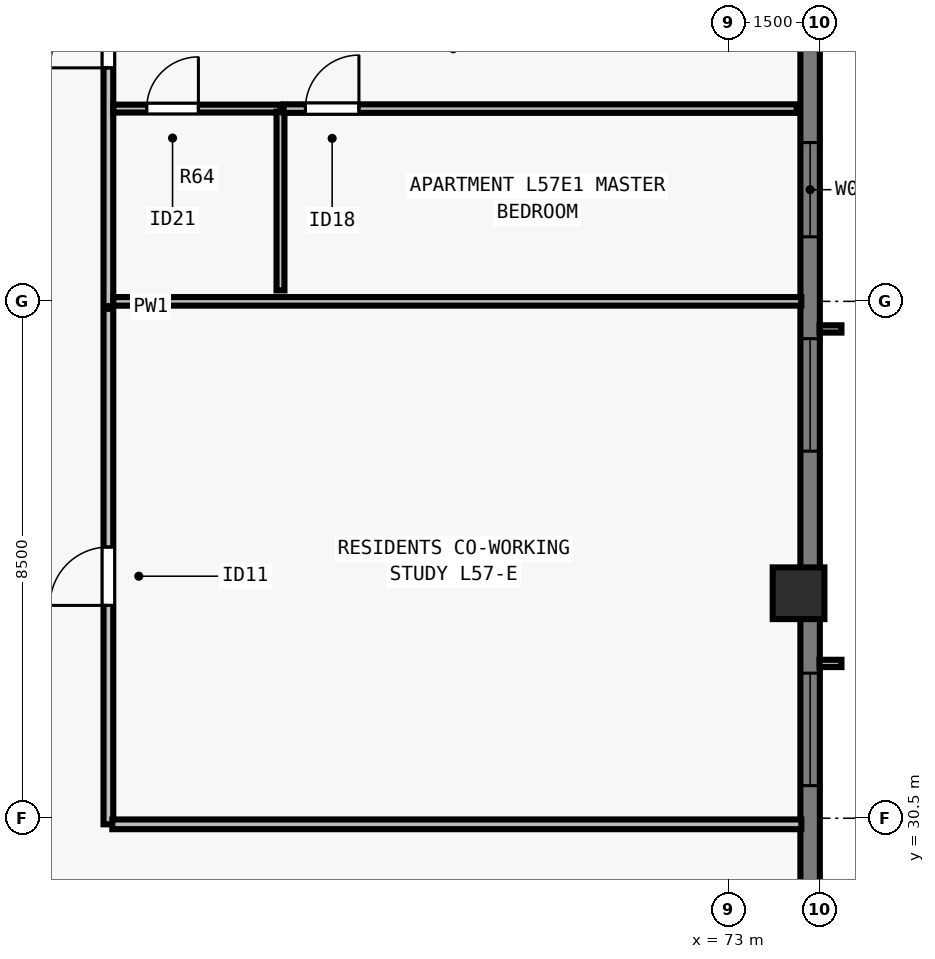
"""IFC4 building model, lengths in metres.
Left out: names, types, materials, properties, quantities, classifications, styles, units other than length and angle.
Written with IfcOpenShell. Run it as: python <this file> out.ifc"""

import sys

from ifc_helpers import new_model, si_unit, direction, frame, frame_2d, origin, origin_2d, place, context, subcontext, project, spatial, rectangle, extrude, element, fill, save


model = new_model("IFC4")
c1 = context("Model", 3, precision=1e-05, world=origin(), true_north=direction((0.0, 1.0)))
c2 = subcontext(c1, "Body", "Model", "MODEL_VIEW")
j1 = project(units=[si_unit("LENGTHUNIT", "METRE"), si_unit("PLANEANGLEUNIT", "RADIAN")], contexts=[c1])
p1 = place(None, origin())
s1 = spatial("IfcSite", under=j1, at=p1, CompositionType="ELEMENT")
p2 = place(p1, origin())
s2 = spatial("IfcBuilding", under=s1, at=p2, CompositionType="ELEMENT")
p3 = place(p2, frame((0.0, 0.0, 209.5)))
s3 = spatial("IfcBuildingStorey", under=s2, at=p3, CompositionType="ELEMENT", Elevation=209.5)
p4 = place(p3, frame((74.15, 34.2, 0.0), z_axis=(0.0, 0.0, 1.0), x_axis=(0.0, 1.0, 0.0)))
e1 = element("IfcColumn", 1, at=p4, inside=s3, PredefinedType="COLUMN", context=c2, shape_type="SweptSolid", body=[
    extrude(rectangle(XDim=0.85, YDim=0.85, at=origin_2d()), origin(), (0.0, 0.0, 1.0), 3.5),
])
p5 = place(p3, frame((74.34, 56.5, 0.0), z_axis=(0.0, 0.0, 1.0), x_axis=(0.0, -1.0, 0.0)))
e2 = element("IfcWall", 2, at=p5, inside=s3, PredefinedType="SOLIDWALL", context=c2, shape_type="SweptSolid", body=[
    extrude(rectangle(XDim=34.702, YDim=0.32, at=frame_2d((17.351, 0.0))), origin(), (0.0, 0.0, 1.0), 3.29),
])
p6 = place(p5, frame((4.163, 0.0, 0.8)))
e3 = element("IfcOpeningElement", 3, at=p6, cuts=e2, PredefinedType="OPENING", context=c2, shape_type="SweptSolid", body=[
    extrude(rectangle(XDim=1.85, YDim=1.678, at=frame_2d((0.925, 0.839))), frame((0.0, 0.17, 0.0), z_axis=(0.0, -1.0, 0.0), x_axis=(1.0, 0.0, 0.0)), (0.0, 0.0, 1.0), 0.34),
])
p7 = place(p5, frame((6.888, 0.0, 0.8)))
e4 = element("IfcOpeningElement", 4, at=p7, cuts=e2, PredefinedType="OPENING", context=c2, shape_type="SweptSolid", body=[
    extrude(rectangle(XDim=1.55, YDim=1.678, at=frame_2d((0.775, 0.839))), frame((0.0, 0.17, 0.0), z_axis=(0.0, -1.0, 0.0), x_axis=(1.0, 0.0, 0.0)), (0.0, 0.0, 1.0), 0.34),
])
p8 = place(p5, frame((10.113, 0.0, 0.8)))
e5 = element("IfcOpeningElement", 5, at=p8, cuts=e2, PredefinedType="OPENING", context=c2, shape_type="SweptSolid", body=[
    extrude(rectangle(XDim=1.85, YDim=1.678, at=frame_2d((0.925, 0.839))), frame((0.0, 0.17, 0.0), z_axis=(0.0, -1.0, 0.0), x_axis=(1.0, 0.0, 0.0)), (0.0, 0.0, 1.0), 0.34),
])
p9 = place(p5, frame((14.888, 0.0, 0.8)))
e6 = element("IfcOpeningElement", 6, at=p9, cuts=e2, PredefinedType="OPENING", context=c2, shape_type="SweptSolid", body=[
    extrude(rectangle(XDim=1.55, YDim=1.678, at=frame_2d((0.775, 0.839))), frame((0.0, 0.17, 0.0), z_axis=(0.0, -1.0, 0.0), x_axis=(1.0, 0.0, 0.0)), (0.0, 0.0, 1.0), 0.34),
])
p10 = place(p5, frame((18.114, 0.0, 0.8)))
e7 = element("IfcOpeningElement", 7, at=p10, cuts=e2, PredefinedType="OPENING", context=c2, shape_type="SweptSolid", body=[
    extrude(rectangle(XDim=1.85, YDim=1.678, at=frame_2d((0.925, 0.839))), frame((0.0, 0.17, 0.0), z_axis=(0.0, -1.0, 0.0), x_axis=(1.0, 0.0, 0.0)), (0.0, 0.0, 1.0), 0.34),
])
p11 = place(p5, frame((23.614, 0.0, 0.8)))
e8 = element("IfcOpeningElement", 8, at=p11, cuts=e2, PredefinedType="OPENING", context=c2, shape_type="SweptSolid", body=[
    extrude(rectangle(XDim=1.85, YDim=1.678, at=frame_2d((0.925, 0.839))), frame((0.0, 0.17, 0.0), z_axis=(0.0, -1.0, 0.0), x_axis=(1.0, 0.0, 0.0)), (0.0, 0.0, 1.0), 0.34),
])
p12 = place(p5, frame((28.839, 0.0, 0.8)))
e9 = element("IfcOpeningElement", 9, at=p12, cuts=e2, PredefinedType="OPENING", context=c2, shape_type="SweptSolid", body=[
    extrude(rectangle(XDim=1.55, YDim=1.678, at=frame_2d((0.775, 0.839))), frame((0.0, 0.17, 0.0), z_axis=(0.0, -1.0, 0.0), x_axis=(1.0, 0.0, 0.0)), (0.0, 0.0, 1.0), 0.34),
])
p13 = place(p3, frame((62.8, 30.4, 0.0), z_axis=(0.0, 0.0, 1.0), x_axis=(0.0, 1.0, 0.0)))
e10 = element("IfcWall", 10, at=p13, inside=s3, PredefinedType="PARTITIONING", context=c2, shape_type="SweptSolid", body=[
    extrude(rectangle(XDim=17.2, YDim=0.16, at=frame_2d((8.6, 0.0))), origin(), (0.0, 0.0, 1.0), 3.29),
])
p14 = place(p13, frame((3.6, 0.0, 0.0)))
e11 = element("IfcOpeningElement", 11, at=p14, cuts=e10, PredefinedType="OPENING", context=c2, shape_type="SweptSolid", body=[
    extrude(rectangle(XDim=0.96, YDim=2.12, at=frame_2d((0.48, 1.06))), frame((0.0, 0.09, 0.0), z_axis=(0.0, -1.0, 0.0), x_axis=(1.0, 0.0, 0.0)), (0.0, 0.0, 1.0), 0.18),
])
p15 = place(p13, frame((12.44, 0.0, 0.0)))
e12 = element("IfcOpeningElement", 12, at=p15, cuts=e10, PredefinedType="OPENING", context=c2, shape_type="SweptSolid", body=[
    extrude(rectangle(XDim=0.96, YDim=2.18, at=frame_2d((0.48, 1.09))), frame((0.0, 0.09, 0.0), z_axis=(0.0, -1.0, 0.0), x_axis=(1.0, 0.0, 0.0)), (0.0, 0.0, 1.0), 0.18),
])
p16 = place(p3, frame((62.865, 30.4, 0.0), z_axis=(0.0, 0.0, 1.0), x_axis=(1.0, 0.0, 0.0)))
e13 = element("IfcWall", 13, at=p16, inside=s3, PredefinedType="PARTITIONING", context=c2, shape_type="SweptSolid", body=[
    extrude(rectangle(XDim=11.33, YDim=0.16, at=frame_2d((5.665, 0.0))), origin(), (0.0, 0.0, 1.0), 3.29),
])
p17 = place(p3, frame((62.88, 39.0, 0.0), z_axis=(0.0, 0.0, 1.0), x_axis=(1.0, 0.0, 0.0)))
e14 = element("IfcWall", 14, at=p17, inside=s3, PredefinedType="PARTITIONING", context=c2, shape_type="SweptSolid", body=[
    extrude(rectangle(XDim=11.315, YDim=0.14, at=frame_2d((5.658, 0.0))), origin(), (0.0, 0.0, 1.0), 3.29),
])
p18 = place(p3, frame((62.88, 42.17, 0.0), z_axis=(0.0, 0.0, 1.0), x_axis=(1.0, 0.0, 0.0)))
e15 = element("IfcWall", 15, at=p18, inside=s3, PredefinedType="PLUMBINGWALL", context=c2, shape_type="SweptSolid", body=[
    extrude(rectangle(XDim=2.75, YDim=0.13, at=frame_2d((1.375, 0.0))), origin(), (0.0, 0.0, 1.0), 3.29),
])
p19 = place(p18, frame((0.55, 0.0, 0.0)))
e16 = element("IfcOpeningElement", 16, at=p19, cuts=e15, PredefinedType="OPENING", context=c2, shape_type="SweptSolid", body=[
    extrude(rectangle(XDim=0.85, YDim=2.08, at=frame_2d((0.425, 1.04))), frame((0.0, 0.075, 0.0), z_axis=(0.0, -1.0, 0.0), x_axis=(1.0, 0.0, 0.0)), (0.0, 0.0, 1.0), 0.15),
])
p20 = place(p3, frame((65.63, 39.18, 0.0), z_axis=(0.0, 0.0, 1.0), x_axis=(0.0, 1.0, 0.0)))
e17 = element("IfcWall", 17, at=p20, inside=s3, PredefinedType="PLUMBINGWALL", context=c2, shape_type="SweptSolid", body=[
    extrude(rectangle(XDim=2.94, YDim=0.13, at=frame_2d((1.47, 0.0))), origin(), (0.0, 0.0, 1.0), 3.29),
])
p21 = place(p3, frame((65.68, 42.17, 0.0), z_axis=(0.0, 0.0, 1.0), x_axis=(1.0, 0.0, 0.0)))
e18 = element("IfcWall", 18, at=p21, inside=s3, PredefinedType="PARTITIONING", context=c2, shape_type="SweptSolid", body=[
    extrude(rectangle(XDim=8.44, YDim=0.14, at=frame_2d((4.22, 0.0))), origin(), (0.0, 0.0, 1.0), 3.29),
])
p22 = place(p21, frame((0.36, 0.0, 0.0)))
e19 = element("IfcOpeningElement", 19, at=p22, cuts=e18, PredefinedType="OPENING", context=c2, shape_type="SweptSolid", body=[
    extrude(rectangle(XDim=0.88, YDim=2.1, at=frame_2d((0.44, 1.05))), frame((0.0, 0.08, 0.0), z_axis=(0.0, -1.0, 0.0), x_axis=(1.0, 0.0, 0.0)), (0.0, 0.0, 1.0), 0.16),
])
p23 = place(p9, origin())
e20 = element("IfcWindow", 20, at=p23, inside=s3, PartitioningType="SINGLE_PANEL", PredefinedType="WINDOW", context=c2, shape_type="SweptSolid", body=[
    extrude(rectangle(XDim=1.55, YDim=1.678, at=frame_2d((0.775, 0.839))), frame((0.0, -0.05, 0.0), z_axis=(0.0, -1.0, 0.0), x_axis=(1.0, 0.0, 0.0)), (0.0, 0.0, 1.0), 0.06),
])
fill(e6, e20)
p24 = place(p10, origin())
e21 = element("IfcWindow", 21, at=p24, inside=s3, PartitioningType="SINGLE_PANEL", PredefinedType="WINDOW", context=c2, shape_type="SweptSolid", body=[
    extrude(rectangle(XDim=1.85, YDim=1.678, at=frame_2d((0.925, 0.839))), frame((0.0, -0.05, 0.0), z_axis=(0.0, -1.0, 0.0), x_axis=(1.0, 0.0, 0.0)), (0.0, 0.0, 1.0), 0.06),
])
fill(e7, e21)
p25 = place(p11, origin())
e22 = element("IfcWindow", 22, at=p25, inside=s3, PartitioningType="SINGLE_PANEL", PredefinedType="WINDOW", context=c2, shape_type="SweptSolid", body=[
    extrude(rectangle(XDim=1.85, YDim=1.678, at=frame_2d((0.925, 0.839))), frame((0.0, -0.05, 0.0), z_axis=(0.0, -1.0, 0.0), x_axis=(1.0, 0.0, 0.0)), (0.0, 0.0, 1.0), 0.06),
])
fill(e8, e22)
p26 = place(p14, origin())
e23 = element("IfcDoor", 23, at=p26, inside=s3, OperationType="SINGLE_SWING_LEFT", PredefinedType="DOOR", context=c2, shape_type="SweptSolid", body=[
    extrude(rectangle(XDim=0.96, YDim=2.12, at=frame_2d((0.48, 1.06))), frame((0.0, 0.025, 0.0), z_axis=(0.0, -1.0, 0.0), x_axis=(1.0, 0.0, 0.0)), (0.0, 0.0, 1.0), 0.05),
])
fill(e11, e23)
p27 = place(p19, origin())
e24 = element("IfcDoor", 24, at=p27, inside=s3, OperationType="SINGLE_SWING_RIGHT", PredefinedType="DOOR", context=c2, shape_type="SweptSolid", body=[
    extrude(rectangle(XDim=0.85, YDim=2.08, at=frame_2d((0.425, 1.04))), frame((0.0, 0.025, 0.0), z_axis=(0.0, -1.0, 0.0), x_axis=(1.0, 0.0, 0.0)), (0.0, 0.0, 1.0), 0.05),
])
fill(e16, e24)
p28 = place(p22, origin())
e25 = element("IfcDoor", 25, at=p28, inside=s3, OperationType="SINGLE_SWING_RIGHT", PredefinedType="DOOR", context=c2, shape_type="SweptSolid", body=[
    extrude(rectangle(XDim=0.88, YDim=2.1, at=frame_2d((0.44, 1.05))), frame((0.0, 0.025, 0.0), z_axis=(0.0, -1.0, 0.0), x_axis=(1.0, 0.0, 0.0)), (0.0, 0.0, 1.0), 0.05),
])
fill(e19, e25)
p29 = place(p15, origin())
e26 = element("IfcDoor", 26, at=p29, inside=s3, OperationType="SINGLE_SWING_LEFT", PredefinedType="DOOR", context=c2, shape_type="SweptSolid", body=[
    extrude(rectangle(XDim=0.96, YDim=2.18, at=frame_2d((0.48, 1.09))), frame((0.0, 0.025, 0.0), z_axis=(0.0, -1.0, 0.0), x_axis=(1.0, 0.0, 0.0)), (0.0, 0.0, 1.0), 0.05),
])
fill(e12, e26)
save(model, sys.argv[1])
